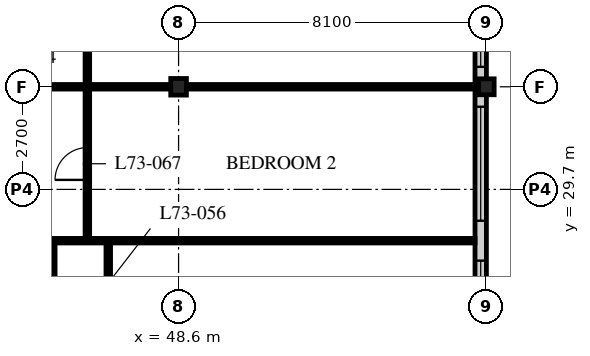
"""IFC4 building model, lengths in metres.
Left out: names, types, materials, properties, quantities, classifications, styles, units other than length and angle.
Written with IfcOpenShell. Run it as: python <this file> out.ifc"""

import sys

from ifc_helpers import new_model, si_unit, direction, frame, frame_2d, origin, origin_2d, place, context, subcontext, project, spatial, rectangle, i_section, extrude, element, fill, save


model = new_model("IFC4")
c1 = context("Model", 3, precision=1e-05, world=origin(), true_north=direction((0.0, 1.0)))
c2 = subcontext(c1, "Body", "Model", "MODEL_VIEW")
j1 = project(units=[si_unit("LENGTHUNIT", "METRE"), si_unit("PLANEANGLEUNIT", "RADIAN")], contexts=[c1])
p1 = place(None, origin())
s1 = spatial("IfcSite", under=j1, at=p1, CompositionType="ELEMENT")
p2 = place(p1, origin())
s2 = spatial("IfcBuilding", under=s1, at=p2, CompositionType="ELEMENT")
p3 = place(p2, frame((0.0, 0.0, 285.3)))
s3 = spatial("IfcBuildingStorey", under=s2, at=p3, CompositionType="ELEMENT", Elevation=285.3)
p4 = place(p3, frame((48.6, 32.4, 0.0), z_axis=(0.0, 0.0, 1.0), x_axis=(1.0, 0.0, 0.0)))
e1 = element("IfcColumn", 1, at=p4, inside=s3, PredefinedType="COLUMN", context=c2, shape_type="SweptSolid", body=[
    extrude(i_section(OverallWidth=0.412, OverallDepth=0.437, WebThickness=0.036, FlangeThickness=0.058, FilletRadius=0.015, at=origin_2d()), origin(), (0.0, 0.0, 1.0), 3.9),
])
p5 = place(p3, frame((56.7, 32.4, 0.0), z_axis=(0.0, 0.0, 1.0), x_axis=(1.0, 0.0, 0.0)))
e2 = element("IfcColumn", 2, at=p5, inside=s3, PredefinedType="COLUMN", context=c2, shape_type="SweptSolid", body=[
    extrude(i_section(OverallWidth=0.407, OverallDepth=0.419, WebThickness=0.031, FlangeThickness=0.049, FilletRadius=0.015, at=origin_2d()), origin(), (0.0, 0.0, 1.0), 3.9),
])
p6 = place(p3, frame((56.55, 24.6, 0.0), z_axis=(0.0, 0.0, 1.0), x_axis=(0.0, 1.0, 0.0)))
e3 = element("IfcWall", 3, at=p6, inside=s3, PredefinedType="SOLIDWALL", context=c2, shape_type="SweptSolid", body=[
    extrude(rectangle(XDim=32.1, YDim=0.3, at=frame_2d((16.05, 0.0))), origin(), (0.0, 0.0, 1.0), 3.69),
])
p7 = place(p6, frame((0.225, 0.0, 0.6)))
e4 = element("IfcOpeningElement", 4, at=p7, cuts=e3, PredefinedType="OPENING", context=c2, shape_type="SweptSolid", body=[
    extrude(rectangle(XDim=3.0, YDim=2.4, at=frame_2d((1.5, 1.2))), frame((0.0, 0.16, 0.0), z_axis=(0.0, -1.0, 0.0), x_axis=(1.0, 0.0, 0.0)), (0.0, 0.0, 1.0), 0.32),
])
p8 = place(p6, frame((4.275, 0.0, 0.6)))
e5 = element("IfcOpeningElement", 5, at=p8, cuts=e3, PredefinedType="OPENING", context=c2, shape_type="SweptSolid", body=[
    extrude(rectangle(XDim=3.0, YDim=2.4, at=frame_2d((1.5, 1.2))), frame((0.0, 0.16, 0.0), z_axis=(0.0, -1.0, 0.0), x_axis=(1.0, 0.0, 0.0)), (0.0, 0.0, 1.0), 0.32),
])
p9 = place(p6, frame((8.325, 0.0, 0.6)))
e6 = element("IfcOpeningElement", 6, at=p9, cuts=e3, PredefinedType="OPENING", context=c2, shape_type="SweptSolid", body=[
    extrude(rectangle(XDim=3.0, YDim=2.4, at=frame_2d((1.5, 1.2))), frame((0.0, 0.16, 0.0), z_axis=(0.0, -1.0, 0.0), x_axis=(1.0, 0.0, 0.0)), (0.0, 0.0, 1.0), 0.32),
])
p10 = place(p6, frame((12.375, 0.0, 0.6)))
e7 = element("IfcOpeningElement", 7, at=p10, cuts=e3, PredefinedType="OPENING", context=c2, shape_type="SweptSolid", body=[
    extrude(rectangle(XDim=3.0, YDim=2.4, at=frame_2d((1.5, 1.2))), frame((0.0, 0.16, 0.0), z_axis=(0.0, -1.0, 0.0), x_axis=(1.0, 0.0, 0.0)), (0.0, 0.0, 1.0), 0.32),
])
p11 = place(p6, frame((16.425, 0.0, 0.6)))
e8 = element("IfcOpeningElement", 8, at=p11, cuts=e3, PredefinedType="OPENING", context=c2, shape_type="SweptSolid", body=[
    extrude(rectangle(XDim=3.0, YDim=2.4, at=frame_2d((1.5, 1.2))), frame((0.0, 0.16, 0.0), z_axis=(0.0, -1.0, 0.0), x_axis=(1.0, 0.0, 0.0)), (0.0, 0.0, 1.0), 0.32),
])
p12 = place(p6, frame((20.475, 0.0, 0.6)))
e9 = element("IfcOpeningElement", 9, at=p12, cuts=e3, PredefinedType="OPENING", context=c2, shape_type="SweptSolid", body=[
    extrude(rectangle(XDim=3.0, YDim=2.4, at=frame_2d((1.5, 1.2))), frame((0.0, 0.16, 0.0), z_axis=(0.0, -1.0, 0.0), x_axis=(1.0, 0.0, 0.0)), (0.0, 0.0, 1.0), 0.32),
])
p13 = place(p6, frame((24.525, 0.0, 0.6)))
e10 = element("IfcOpeningElement", 10, at=p13, cuts=e3, PredefinedType="OPENING", context=c2, shape_type="SweptSolid", body=[
    extrude(rectangle(XDim=3.0, YDim=2.4, at=frame_2d((1.5, 1.2))), frame((0.0, 0.16, 0.0), z_axis=(0.0, -1.0, 0.0), x_axis=(1.0, 0.0, 0.0)), (0.0, 0.0, 1.0), 0.32),
])
p14 = place(p6, frame((28.575, 0.0, 0.6)))
e11 = element("IfcOpeningElement", 11, at=p14, cuts=e3, PredefinedType="OPENING", context=c2, shape_type="SweptSolid", body=[
    extrude(rectangle(XDim=3.0, YDim=2.4, at=frame_2d((1.5, 1.2))), frame((0.0, 0.16, 0.0), z_axis=(0.0, -1.0, 0.0), x_axis=(1.0, 0.0, 0.0)), (0.0, 0.0, 1.0), 0.32),
])
p15 = place(p3, frame((45.3, 26.05, 0.0), z_axis=(0.0, 0.0, 1.0), x_axis=(0.0, 1.0, 0.0)))
e12 = element("IfcWall", 12, at=p15, inside=s3, PredefinedType="PARTITIONING", context=c2, shape_type="SweptSolid", body=[
    extrude(rectangle(XDim=2.3, YDim=0.1, at=frame_2d((1.15, 0.0))), origin(), (0.0, 0.0, 1.0), 3.69),
])
p16 = place(p3, frame((42.9, 28.35, 0.0), z_axis=(0.0, 0.0, 1.0), x_axis=(1.0, 0.0, 0.0)))
e13 = element("IfcWall", 13, at=p16, inside=s3, PredefinedType="PARTITIONING", context=c2, shape_type="SweptSolid", body=[
    extrude(rectangle(XDim=13.5, YDim=0.12, at=frame_2d((6.75, 0.0))), origin(), (0.0, 0.0, 1.0), 3.69),
])
p17 = place(p3, frame((42.9, 32.4, 0.0), z_axis=(0.0, 0.0, 1.0), x_axis=(1.0, 0.0, 0.0)))
e14 = element("IfcWall", 14, at=p17, inside=s3, PredefinedType="PARTITIONING", context=c2, shape_type="SweptSolid", body=[
    extrude(rectangle(XDim=13.5, YDim=0.12, at=frame_2d((6.75, 0.0))), origin(), (0.0, 0.0, 1.0), 3.078),
])
p18 = place(p3, frame((46.75, 24.3, 0.0), z_axis=(0.0, 0.0, 1.0), x_axis=(0.0, 1.0, 0.0)))
e15 = element("IfcWall", 15, at=p18, inside=s3, PredefinedType="PARTITIONING", context=c2, shape_type="SweptSolid", body=[
    extrude(rectangle(XDim=4.05, YDim=0.12, at=frame_2d((2.025, 0.0))), origin(), (0.0, 0.0, 1.0), 3.69),
])
p19 = place(p18, frame((1.6, 0.0, 0.0)))
e16 = element("IfcOpeningElement", 16, at=p19, cuts=e15, PredefinedType="OPENING", context=c2, shape_type="SweptSolid", body=[
    extrude(rectangle(XDim=0.85, YDim=2.1, at=frame_2d((0.425, 1.05))), frame((0.0, 0.07, 0.0), z_axis=(0.0, -1.0, 0.0), x_axis=(1.0, 0.0, 0.0)), (0.0, 0.0, 1.0), 0.14),
])
p20 = place(p3, frame((46.2, 28.35, 0.0), z_axis=(0.0, 0.0, 1.0), x_axis=(0.0, 1.0, 0.0)))
e17 = element("IfcWall", 17, at=p20, inside=s3, PredefinedType="PARTITIONING", context=c2, shape_type="SweptSolid", body=[
    extrude(rectangle(XDim=12.15, YDim=0.12, at=frame_2d((6.075, 0.0))), origin(), (0.0, 0.0, 1.0), 3.69),
])
p21 = place(p20, frame((1.6, 0.0, 0.0)))
e18 = element("IfcOpeningElement", 18, at=p21, cuts=e17, PredefinedType="OPENING", context=c2, shape_type="SweptSolid", body=[
    extrude(rectangle(XDim=0.85, YDim=2.1, at=frame_2d((0.425, 1.05))), frame((0.0, 0.07, 0.0), z_axis=(0.0, -1.0, 0.0), x_axis=(1.0, 0.0, 0.0)), (0.0, 0.0, 1.0), 0.14),
])
p22 = place(p20, frame((5.65, 0.0, 0.0)))
e19 = element("IfcOpeningElement", 19, at=p22, cuts=e17, PredefinedType="OPENING", context=c2, shape_type="SweptSolid", body=[
    extrude(rectangle(XDim=0.85, YDim=2.1, at=frame_2d((0.425, 1.05))), frame((0.0, 0.07, 0.0), z_axis=(0.0, -1.0, 0.0), x_axis=(1.0, 0.0, 0.0)), (0.0, 0.0, 1.0), 0.14),
])
p23 = place(p20, frame((9.7, 0.0, 0.0)))
e20 = element("IfcOpeningElement", 20, at=p23, cuts=e17, PredefinedType="OPENING", context=c2, shape_type="SweptSolid", body=[
    extrude(rectangle(XDim=0.85, YDim=2.1, at=frame_2d((0.425, 1.05))), frame((0.0, 0.07, 0.0), z_axis=(0.0, -1.0, 0.0), x_axis=(1.0, 0.0, 0.0)), (0.0, 0.0, 1.0), 0.14),
])
p24 = place(p7, origin())
e21 = element("IfcWindow", 21, at=p24, inside=s3, PartitioningType="SINGLE_PANEL", PredefinedType="WINDOW", context=c2, shape_type="SweptSolid", body=[
    extrude(rectangle(XDim=3.0, YDim=2.4, at=frame_2d((1.5, 1.2))), frame((0.0, 0.03, 0.0), z_axis=(0.0, -1.0, 0.0), x_axis=(1.0, 0.0, 0.0)), (0.0, 0.0, 1.0), 0.06),
])
fill(e4, e21)
p25 = place(p8, origin())
e22 = element("IfcWindow", 22, at=p25, inside=s3, PartitioningType="SINGLE_PANEL", PredefinedType="WINDOW", context=c2, shape_type="SweptSolid", body=[
    extrude(rectangle(XDim=3.0, YDim=2.4, at=frame_2d((1.5, 1.2))), frame((0.0, 0.03, 0.0), z_axis=(0.0, -1.0, 0.0), x_axis=(1.0, 0.0, 0.0)), (0.0, 0.0, 1.0), 0.06),
])
fill(e5, e22)
p26 = place(p9, origin())
e23 = element("IfcWindow", 23, at=p26, inside=s3, PartitioningType="SINGLE_PANEL", PredefinedType="WINDOW", context=c2, shape_type="SweptSolid", body=[
    extrude(rectangle(XDim=3.0, YDim=2.4, at=frame_2d((1.5, 1.2))), frame((0.0, 0.03, 0.0), z_axis=(0.0, -1.0, 0.0), x_axis=(1.0, 0.0, 0.0)), (0.0, 0.0, 1.0), 0.06),
])
fill(e6, e23)
p27 = place(p21, origin())
e24 = element("IfcDoor", 24, at=p27, inside=s3, OperationType="SINGLE_SWING_LEFT", PredefinedType="DOOR", context=c2, shape_type="SweptSolid", body=[
    extrude(rectangle(XDim=0.85, YDim=2.1, at=frame_2d((0.425, 1.05))), frame((0.0, 0.025, 0.0), z_axis=(0.0, -1.0, 0.0), x_axis=(1.0, 0.0, 0.0)), (0.0, 0.0, 1.0), 0.05),
])
fill(e18, e24)
save(model, sys.argv[1])
